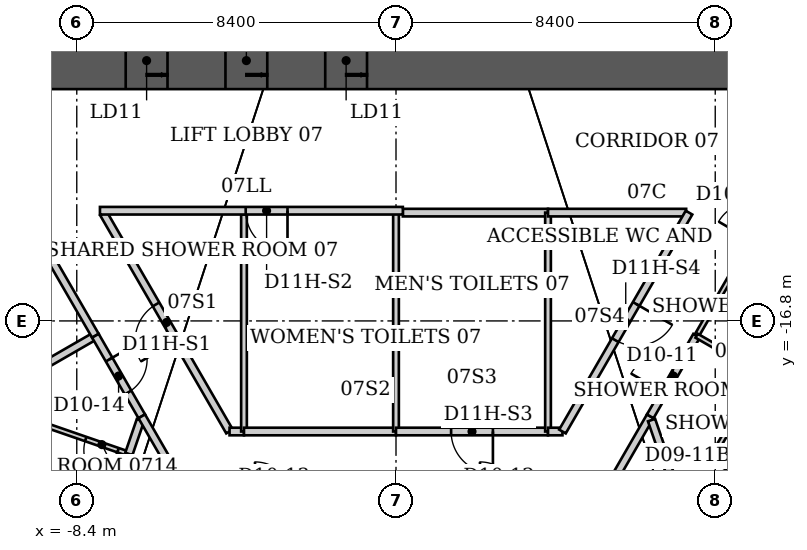
"""IFC4 building model, lengths in metres.
Left out: names, types, materials, properties, quantities, classifications, styles, units other than length and angle.
Written with IfcOpenShell. Run it as: python <this file> out.ifc"""

import sys

from ifc_helpers import new_model, si_unit, direction, frame, frame_2d, origin, place, context, subcontext, project, spatial, rectangle, extrude, element, fill, save


model = new_model("IFC4")
c1 = context("Model", 3, precision=1e-05, world=origin(), true_north=direction((0.0, 1.0)))
c2 = subcontext(c1, "Body", "Model", "MODEL_VIEW")
j1 = project(units=[si_unit("LENGTHUNIT", "METRE"), si_unit("PLANEANGLEUNIT", "RADIAN")], contexts=[c1])
p1 = place(None, origin())
s1 = spatial("IfcSite", under=j1, at=p1, CompositionType="ELEMENT")
p2 = place(p1, origin())
s2 = spatial("IfcBuilding", under=s1, at=p2, CompositionType="ELEMENT")
p3 = place(p2, frame((0.0, 0.0, 34.4)))
s3 = spatial("IfcBuildingStorey", under=s2, at=p3, CompositionType="ELEMENT", Elevation=34.4)
p4 = place(p3, frame((-9.25, -9.95, 0.0), z_axis=(0.0, 0.0, 1.0), x_axis=(1.0, 0.0, 0.0)))
e1 = element("IfcWall", 1, at=p4, inside=s3, PredefinedType="SHEAR", context=c2, shape_type="SweptSolid", body=[
    extrude(rectangle(XDim=18.5, YDim=1.5, at=frame_2d((9.25, 0.0))), origin(), (0.0, 0.0, 1.0), 3.8),
])
p5 = place(p4, frame((2.137, 0.0, 0.0)))
e2 = element("IfcOpeningElement", 2, at=p5, cuts=e1, PredefinedType="OPENING", context=c2, shape_type="SweptSolid", body=[
    extrude(rectangle(XDim=1.1, YDim=2.1, at=frame_2d((0.55, 1.05))), frame((0.0, 0.75, 0.0), z_axis=(0.0, -1.0, 0.0), x_axis=(1.0, 0.0, 0.0)), (0.0, 0.0, 1.0), 1.5),
])
p6 = place(p4, frame((4.762, 0.0, 0.0)))
e3 = element("IfcOpeningElement", 3, at=p6, cuts=e1, PredefinedType="OPENING", context=c2, shape_type="SweptSolid", body=[
    extrude(rectangle(XDim=1.1, YDim=2.1, at=frame_2d((0.55, 1.05))), frame((0.0, 0.75, 0.0), z_axis=(0.0, -1.0, 0.0), x_axis=(1.0, 0.0, 0.0)), (0.0, 0.0, 1.0), 1.5),
])
p7 = place(p4, frame((7.387, 0.0, 0.0)))
e4 = element("IfcOpeningElement", 4, at=p7, cuts=e1, PredefinedType="OPENING", context=c2, shape_type="SweptSolid", body=[
    extrude(rectangle(XDim=1.1, YDim=2.1, at=frame_2d((0.55, 1.05))), frame((0.0, 0.75, 0.0), z_axis=(0.0, -1.0, 0.0), x_axis=(1.0, 0.0, 0.0)), (0.0, 0.0, 1.0), 1.5),
])
p8 = place(p3, frame((-15.176, -21.38, 0.0), z_axis=(0.0, 0.0, 1.0), x_axis=(0.866276837306, 0.49956425127, 0.0)))
e5 = element("IfcWall", 5, at=p8, inside=s3, PredefinedType="PARTITIONING", context=c2, shape_type="SweptSolid", body=[
    extrude(rectangle(XDim=8.373, YDim=0.2, at=frame_2d((4.186, 0.0))), origin(), (0.0, 0.0, 1.0), 3.64),
])
p9 = place(p3, frame((-12.29, -9.62, 0.0), z_axis=(0.0, 0.0, 1.0), x_axis=(0.500830481537, -0.86554539382, 0.0)))
e6 = element("IfcWall", 6, at=p9, inside=s3, PredefinedType="PARTITIONING", context=c2, shape_type="SweptSolid", body=[
    extrude(rectangle(XDim=8.746, YDim=0.2, at=frame_2d((4.373, 0.0))), origin(), (0.0, 0.0, 1.0), 3.64),
])
p10 = place(p9, frame((3.823, 0.0, 0.0)))
e7 = element("IfcOpeningElement", 7, at=p10, cuts=e6, PredefinedType="OPENING", context=c2, shape_type="SweptSolid", body=[
    extrude(rectangle(XDim=1.1, YDim=2.2, at=frame_2d((0.55, 1.1))), frame((0.0, 0.1, 0.0), z_axis=(0.0, -1.0, 0.0), x_axis=(1.0, 0.0, 0.0)), (0.0, 0.0, 1.0), 0.2),
])
p11 = place(p3, frame((-7.91, -17.19, 0.0), z_axis=(0.0, 0.0, 1.0), x_axis=(0.498748634132, -0.866746675766, 0.0)))
e8 = element("IfcWall", 8, at=p11, inside=s3, PredefinedType="PARTITIONING", context=c2, shape_type="SweptSolid", body=[
    extrude(rectangle(XDim=2.446, YDim=0.2, at=frame_2d((1.223, 0.0))), origin(), (0.0, 0.0, 1.0), 3.64),
])
p12 = place(p11, frame((0.723, 0.0, 0.0)))
e9 = element("IfcOpeningElement", 9, at=p12, cuts=e8, PredefinedType="OPENING", context=c2, shape_type="SweptSolid", body=[
    extrude(rectangle(XDim=1.0, YDim=2.13, at=frame_2d((0.5, 1.065))), frame((0.0, 0.1, 0.0), z_axis=(0.0, -1.0, 0.0), x_axis=(1.0, 0.0, 0.0)), (0.0, 0.0, 1.0), 0.2),
])
p13 = place(p3, frame((-7.82, -22.57, 0.0), z_axis=(0.0, 0.0, 1.0), x_axis=(0.328693963496, 0.944436487203, 0.0)))
e10 = element("IfcWall", 10, at=p13, inside=s3, PredefinedType="PARTITIONING", context=c2, shape_type="SweptSolid", body=[
    extrude(rectangle(XDim=2.404, YDim=0.12, at=frame_2d((1.202, 0.0))), origin(), (0.0, 0.0, 1.0), 3.64),
])
p14 = place(p3, frame((-7.03, -20.3, 0.0), z_axis=(0.0, 0.0, 1.0), x_axis=(-0.94515546045, 0.326620813149, 0.0)))
e11 = element("IfcWall", 11, at=p14, inside=s3, PredefinedType="PARTITIONING", context=c2, shape_type="SweptSolid", body=[
    extrude(rectangle(XDim=2.603, YDim=0.12, at=frame_2d((1.301, 0.0))), origin(), (0.0, 0.0, 1.0), 3.64),
])
p15 = place(p14, frame((0.3, 0.0, 0.0)))
e12 = element("IfcOpeningElement", 12, at=p15, cuts=e11, PredefinedType="OPENING", context=c2, shape_type="SweptSolid", body=[
    extrude(rectangle(XDim=0.9, YDim=2.03, at=frame_2d((0.45, 1.015))), frame((0.0, 0.06, 0.0), z_axis=(0.0, -1.0, 0.0), x_axis=(1.0, 0.0, 0.0)), (0.0, 0.0, 1.0), 0.12),
])
p16 = place(p3, frame((-7.03, -20.3, 0.0), z_axis=(0.0, 0.0, 1.0), x_axis=(0.324737408014, 0.94580421644, 0.0)))
e13 = element("IfcWall", 13, at=p16, inside=s3, PredefinedType="PARTITIONING", context=c2, shape_type="SweptSolid", body=[
    extrude(rectangle(XDim=0.937, YDim=0.2, at=frame_2d((0.468, 0.0))), origin(), (0.0, 0.0, 1.0), 3.64),
])
p17 = place(p3, frame((-6.69, -19.31, 0.0), z_axis=(0.0, 0.0, 1.0), x_axis=(0.499963722229, -0.866046347752, 0.0)))
e14 = element("IfcWall", 14, at=p17, inside=s3, PredefinedType="PARTITIONING", context=c2, shape_type="SweptSolid", body=[
    extrude(rectangle(XDim=2.54, YDim=0.2, at=frame_2d((1.27, 0.0))), origin(), (0.0, 0.0, 1.0), 3.64),
])
p18 = place(p3, frame((-4.38, -19.71, 0.0), z_axis=(0.0, 0.0, 1.0), x_axis=(-0.500523653757, 0.865722860984, 0.0)))
e15 = element("IfcWall", 15, at=p18, inside=s3, PredefinedType="PARTITIONING", context=c2, shape_type="SweptSolid", body=[
    extrude(rectangle(XDim=6.628, YDim=0.2, at=frame_2d((3.314, 0.0))), origin(), (0.0, 0.0, 1.0), 3.64),
])
p19 = place(p18, frame((2.764, 0.0, 0.0)))
e16 = element("IfcOpeningElement", 16, at=p19, cuts=e15, PredefinedType="OPENING", context=c2, shape_type="SweptSolid", body=[
    extrude(rectangle(XDim=1.1, YDim=2.2, at=frame_2d((0.55, 1.1))), frame((0.0, 0.1, 0.0), z_axis=(0.0, -1.0, 0.0), x_axis=(1.0, 0.0, 0.0)), (0.0, 0.0, 1.0), 0.2),
])
p20 = place(p3, frame((-4.0, -19.71, 0.0), z_axis=(0.0, 0.0, 1.0), x_axis=(-1.0, 0.0, 0.0)))
e17 = element("IfcWall", 17, at=p20, inside=s3, PredefinedType="PARTITIONING", context=c2, shape_type="SweptSolid", body=[
    extrude(rectangle(XDim=0.38, YDim=0.2, at=frame_2d((0.19, 0.0))), origin(), (0.0, 0.0, 1.0), 3.64),
])
p21 = place(p3, frame((-4.0, -14.0, 0.0), z_axis=(0.0, 0.0, 1.0), x_axis=(0.0, -1.0, 0.0)))
e18 = element("IfcWall", 18, at=p21, inside=s3, PredefinedType="PARTITIONING", context=c2, shape_type="SweptSolid", body=[
    extrude(rectangle(XDim=5.71, YDim=0.15, at=frame_2d((2.855, 0.0))), origin(), (0.0, 0.0, 1.0), 3.64),
])
p22 = place(p3, frame((0.0, -19.71, 0.0), z_axis=(0.0, 0.0, 1.0), x_axis=(-1.0, 0.0, 0.0)))
e19 = element("IfcWall", 19, at=p22, inside=s3, PredefinedType="PARTITIONING", context=c2, shape_type="SweptSolid", body=[
    extrude(rectangle(XDim=4.0, YDim=0.2, at=frame_2d((2.0, 0.0))), origin(), (0.0, 0.0, 1.0), 3.64),
])
p23 = place(p3, frame((0.0, -13.95, 0.0), z_axis=(0.0, 0.0, 1.0), x_axis=(0.0, -1.0, 0.0)))
e20 = element("IfcWall", 20, at=p23, inside=s3, PredefinedType="PARTITIONING", context=c2, shape_type="SweptSolid", body=[
    extrude(rectangle(XDim=5.76, YDim=0.15, at=frame_2d((2.88, 0.0))), origin(), (0.0, 0.0, 1.0), 2.86),
])
p24 = place(p3, frame((0.18, -13.95, 0.0), z_axis=(0.0, 0.0, 1.0), x_axis=(1.0, 0.0, 0.0)))
e21 = element("IfcWall", 21, at=p24, inside=s3, PredefinedType="PARTITIONING", context=c2, shape_type="SweptSolid", body=[
    extrude(rectangle(XDim=3.82, YDim=0.2, at=frame_2d((1.91, 0.0))), origin(), (0.0, 0.0, 1.0), 3.64),
])
p25 = place(p3, frame((0.18, -13.9, 0.0), z_axis=(0.0, 0.0, 1.0), x_axis=(-1.0, 0.0, 0.0)))
e22 = element("IfcWall", 22, at=p25, inside=s3, PredefinedType="PARTITIONING", context=c2, shape_type="SweptSolid", body=[
    extrude(rectangle(XDim=7.97, YDim=0.2, at=frame_2d((3.985, 0.0))), origin(), (0.0, 0.0, 1.0), 3.64),
])
p26 = place(p25, frame((3.035, 0.0, 0.0)))
e23 = element("IfcOpeningElement", 23, at=p26, cuts=e22, PredefinedType="OPENING", context=c2, shape_type="SweptSolid", body=[
    extrude(rectangle(XDim=1.1, YDim=2.2, at=frame_2d((0.55, 1.1))), frame((0.0, 0.1, 0.0), z_axis=(0.0, -1.0, 0.0), x_axis=(1.0, 0.0, 0.0)), (0.0, 0.0, 1.0), 0.2),
])
p27 = place(p3, frame((4.0, -19.71, 0.0), z_axis=(0.0, 0.0, 1.0), x_axis=(-1.0, 0.0, 0.0)))
e24 = element("IfcWall", 24, at=p27, inside=s3, PredefinedType="PARTITIONING", context=c2, shape_type="SweptSolid", body=[
    extrude(rectangle(XDim=4.0, YDim=0.2, at=frame_2d((2.0, 0.0))), origin(), (0.0, 0.0, 1.0), 3.64),
])
p28 = place(p27, frame((1.45, 0.0, 0.0)))
e25 = element("IfcOpeningElement", 25, at=p28, cuts=e24, PredefinedType="OPENING", context=c2, shape_type="SweptSolid", body=[
    extrude(rectangle(XDim=1.1, YDim=2.2, at=frame_2d((0.55, 1.1))), frame((0.0, 0.1, 0.0), z_axis=(0.0, -1.0, 0.0), x_axis=(1.0, 0.0, 0.0)), (0.0, 0.0, 1.0), 0.2),
])
p29 = place(p3, frame((4.0, -13.95, 0.0), z_axis=(0.0, 0.0, 1.0), x_axis=(0.0, -1.0, 0.0)))
e26 = element("IfcWall", 26, at=p29, inside=s3, PredefinedType="PARTITIONING", context=c2, shape_type="SweptSolid", body=[
    extrude(rectangle(XDim=5.76, YDim=0.15, at=frame_2d((2.88, 0.0))), origin(), (0.0, 0.0, 1.0), 3.64),
])
p30 = place(p3, frame((4.0, -13.95, 0.0), z_axis=(0.0, 0.0, 1.0), x_axis=(1.0, 0.0, 0.0)))
e27 = element("IfcWall", 27, at=p30, inside=s3, PredefinedType="PARTITIONING", context=c2, shape_type="SweptSolid", body=[
    extrude(rectangle(XDim=3.635, YDim=0.2, at=frame_2d((1.817, 0.0))), origin(), (0.0, 0.0, 1.0), 3.64),
])
p31 = place(p3, frame((4.38, -19.71, 0.0), z_axis=(0.0, 0.0, 1.0), x_axis=(-1.0, 0.0, 0.0)))
e28 = element("IfcWall", 28, at=p31, inside=s3, PredefinedType="PARTITIONING", context=c2, shape_type="SweptSolid", body=[
    extrude(rectangle(XDim=0.38, YDim=0.2, at=frame_2d((0.19, 0.0))), origin(), (0.0, 0.0, 1.0), 3.64),
])
p32 = place(p3, frame((5.42, -21.51, 0.0), z_axis=(0.0, 0.0, 1.0), x_axis=(0.499963722229, 0.866046347752, 0.0)))
e29 = element("IfcWall", 29, at=p32, inside=s3, PredefinedType="PARTITIONING", context=c2, shape_type="SweptSolid", body=[
    extrude(rectangle(XDim=2.54, YDim=0.2, at=frame_2d((1.27, 0.0))), origin(), (0.0, 0.0, 1.0), 3.64),
])
p33 = place(p3, frame((6.69, -19.31, 0.0), z_axis=(0.0, 0.0, 1.0), x_axis=(0.498748634132, 0.866746675766, 0.0)))
e30 = element("IfcWall", 30, at=p33, inside=s3, PredefinedType="PARTITIONING", context=c2, shape_type="SweptSolid", body=[
    extrude(rectangle(XDim=2.446, YDim=0.2, at=frame_2d((1.223, 0.0))), origin(), (0.0, 0.0, 1.0), 3.64),
])
p34 = place(p33, frame((0.723, 0.0, 0.0)))
e31 = element("IfcOpeningElement", 31, at=p34, cuts=e30, PredefinedType="OPENING", context=c2, shape_type="SweptSolid", body=[
    extrude(rectangle(XDim=1.0, YDim=2.13, at=frame_2d((0.5, 1.065))), frame((0.0, 0.1, 0.0), z_axis=(0.0, -1.0, 0.0), x_axis=(1.0, 0.0, 0.0)), (0.0, 0.0, 1.0), 0.2),
])
p35 = place(p3, frame((6.724, -19.409, 0.0), z_axis=(0.0, 0.0, 1.0), x_axis=(0.326182205696, -0.945306917719, 0.0)))
e32 = element("IfcWall", 32, at=p35, inside=s3, PredefinedType="PARTITIONING", context=c2, shape_type="SweptSolid", body=[
    extrude(rectangle(XDim=2.593, YDim=0.2, at=frame_2d((1.296, 0.0))), origin(), (0.0, 0.0, 1.0), 3.64),
])
p36 = place(p3, frame((7.71, -13.95, 0.0), z_axis=(0.0, 0.0, 1.0), x_axis=(-0.500511113963, -0.865730110831, 0.0)))
e33 = element("IfcWall", 33, at=p36, inside=s3, PredefinedType="PARTITIONING", context=c2, shape_type="SweptSolid", body=[
    extrude(rectangle(XDim=6.653, YDim=0.2, at=frame_2d((3.327, 0.0))), origin(), (0.0, 0.0, 1.0), 3.64),
])
p37 = place(p36, frame((2.777, 0.0, 0.0)))
e34 = element("IfcOpeningElement", 34, at=p37, cuts=e33, PredefinedType="OPENING", context=c2, shape_type="SweptSolid", body=[
    extrude(rectangle(XDim=1.1, YDim=2.2, at=frame_2d((0.55, 1.1))), frame((0.0, 0.1, 0.0), z_axis=(0.0, -1.0, 0.0), x_axis=(1.0, 0.0, 0.0)), (0.0, 0.0, 1.0), 0.2),
])
p38 = place(p3, frame((7.91, -17.19, 0.0), z_axis=(0.0, 0.0, 1.0), x_axis=(0.499737123639, 0.866177122335, 0.0)))
e35 = element("IfcWall", 35, at=p38, inside=s3, PredefinedType="PARTITIONING", context=c2, shape_type="SweptSolid", body=[
    extrude(rectangle(XDim=2.401, YDim=0.12, at=frame_2d((1.201, 0.0))), origin(), (0.0, 0.0, 1.0), 3.64),
])
p39 = place(p3, frame((7.91, -17.19, 0.0), z_axis=(0.0, 0.0, 1.0), x_axis=(0.8673242112, -0.497743621421, 0.0)))
e36 = element("IfcWall", 36, at=p39, inside=s3, PredefinedType="PARTITIONING", context=c2, shape_type="SweptSolid", body=[
    extrude(rectangle(XDim=1.949, YDim=0.12, at=frame_2d((0.974, 0.0))), origin(), (0.0, 0.0, 1.0), 3.64),
])
p40 = place(p3, frame((8.3, -20.42, 0.0), z_axis=(0.0, 0.0, 1.0), x_axis=(0.866177122335, -0.499737123639, 0.0)))
e37 = element("IfcWall", 37, at=p40, inside=s3, PredefinedType="PARTITIONING", context=c2, shape_type="SweptSolid", body=[
    extrude(rectangle(XDim=2.401, YDim=0.12, at=frame_2d((1.201, 0.0))), origin(), (0.0, 0.0, 1.0), 3.64),
])
p41 = place(p3, frame((9.6, -18.16, 0.0), z_axis=(0.0, 0.0, 1.0), x_axis=(-0.498627694264, -0.866816256489, 0.0)))
e38 = element("IfcWall", 38, at=p41, inside=s3, PredefinedType="PARTITIONING", context=c2, shape_type="SweptSolid", body=[
    extrude(rectangle(XDim=2.607, YDim=0.12, at=frame_2d((1.304, 0.0))), origin(), (0.0, 0.0, 1.0), 3.64),
])
p42 = place(p41, frame((0.3, 0.0, 0.0)))
e39 = element("IfcOpeningElement", 39, at=p42, cuts=e38, PredefinedType="OPENING", context=c2, shape_type="SweptSolid", body=[
    extrude(rectangle(XDim=0.9, YDim=2.03, at=frame_2d((0.45, 1.015))), frame((0.0, 0.06, 0.0), z_axis=(0.0, -1.0, 0.0), x_axis=(1.0, 0.0, 0.0)), (0.0, 0.0, 1.0), 0.12),
])
p43 = place(p34, origin())
e40 = element("IfcDoor", 40, at=p43, inside=s3, OperationType="SINGLE_SWING_LEFT", PredefinedType="DOOR", context=c2, shape_type="SweptSolid", body=[
    extrude(rectangle(XDim=1.0, YDim=2.13, at=frame_2d((0.5, 1.065))), frame((0.0, 0.025, 0.0), z_axis=(0.0, -1.0, 0.0), x_axis=(1.0, 0.0, 0.0)), (0.0, 0.0, 1.0), 0.05),
])
fill(e31, e40)
p44 = place(p12, origin())
e41 = element("IfcDoor", 41, at=p44, inside=s3, OperationType="SINGLE_SWING_LEFT", PredefinedType="DOOR", context=c2, shape_type="SweptSolid", body=[
    extrude(rectangle(XDim=1.0, YDim=2.13, at=frame_2d((0.5, 1.065))), frame((0.0, 0.025, 0.0), z_axis=(0.0, -1.0, 0.0), x_axis=(1.0, 0.0, 0.0)), (0.0, 0.0, 1.0), 0.05),
])
fill(e9, e41)
p45 = place(p15, origin())
e42 = element("IfcDoor", 42, at=p45, inside=s3, OperationType="SINGLE_SWING_LEFT", PredefinedType="DOOR", context=c2, shape_type="SweptSolid", body=[
    extrude(rectangle(XDim=0.9, YDim=2.03, at=frame_2d((0.45, 1.015))), frame((0.0, 0.025, 0.0), z_axis=(0.0, -1.0, 0.0), x_axis=(1.0, 0.0, 0.0)), (0.0, 0.0, 1.0), 0.05),
])
fill(e12, e42)
p46 = place(p19, origin())
e43 = element("IfcDoor", 43, at=p46, inside=s3, OperationType="SINGLE_SWING_LEFT", PredefinedType="DOOR", context=c2, shape_type="SweptSolid", body=[
    extrude(rectangle(XDim=1.1, YDim=2.2, at=frame_2d((0.55, 1.1))), frame((0.0, 0.025, 0.0), z_axis=(0.0, -1.0, 0.0), x_axis=(1.0, 0.0, 0.0)), (0.0, 0.0, 1.0), 0.05),
])
fill(e16, e43)
p47 = place(p26, origin())
e44 = element("IfcDoor", 44, at=p47, inside=s3, OperationType="SINGLE_SWING_LEFT", PredefinedType="DOOR", context=c2, shape_type="SweptSolid", body=[
    extrude(rectangle(XDim=1.1, YDim=2.2, at=frame_2d((0.55, 1.1))), frame((0.0, 0.025, 0.0), z_axis=(0.0, -1.0, 0.0), x_axis=(1.0, 0.0, 0.0)), (0.0, 0.0, 1.0), 0.05),
])
fill(e23, e44)
p48 = place(p28, origin())
e45 = element("IfcDoor", 45, at=p48, inside=s3, OperationType="SINGLE_SWING_LEFT", PredefinedType="DOOR", context=c2, shape_type="SweptSolid", body=[
    extrude(rectangle(XDim=1.1, YDim=2.2, at=frame_2d((0.55, 1.1))), frame((0.0, 0.025, 0.0), z_axis=(0.0, -1.0, 0.0), x_axis=(1.0, 0.0, 0.0)), (0.0, 0.0, 1.0), 0.05),
])
fill(e25, e45)
p49 = place(p37, origin())
e46 = element("IfcDoor", 46, at=p49, inside=s3, OperationType="SINGLE_SWING_LEFT", PredefinedType="DOOR", context=c2, shape_type="SweptSolid", body=[
    extrude(rectangle(XDim=1.1, YDim=2.2, at=frame_2d((0.55, 1.1))), frame((0.0, 0.025, 0.0), z_axis=(0.0, -1.0, 0.0), x_axis=(1.0, 0.0, 0.0)), (0.0, 0.0, 1.0), 0.05),
])
fill(e34, e46)
p50 = place(p5, origin())
e47 = element("IfcDoor", 47, at=p50, inside=s3, OperationType="DOUBLE_DOOR_SLIDING", PredefinedType="DOOR", context=c2, shape_type="SweptSolid", body=[
    extrude(rectangle(XDim=1.1, YDim=2.1, at=frame_2d((0.55, 1.05))), frame((0.0, 0.025, 0.0), z_axis=(0.0, -1.0, 0.0), x_axis=(1.0, 0.0, 0.0)), (0.0, 0.0, 1.0), 0.05),
])
fill(e2, e47)
p51 = place(p6, origin())
e48 = element("IfcDoor", 48, at=p51, inside=s3, OperationType="DOUBLE_DOOR_SLIDING", PredefinedType="DOOR", context=c2, shape_type="SweptSolid", body=[
    extrude(rectangle(XDim=1.1, YDim=2.1, at=frame_2d((0.55, 1.05))), frame((0.0, 0.025, 0.0), z_axis=(0.0, -1.0, 0.0), x_axis=(1.0, 0.0, 0.0)), (0.0, 0.0, 1.0), 0.05),
])
fill(e3, e48)
p52 = place(p7, origin())
e49 = element("IfcDoor", 49, at=p52, inside=s3, OperationType="DOUBLE_DOOR_SLIDING", PredefinedType="DOOR", context=c2, shape_type="SweptSolid", body=[
    extrude(rectangle(XDim=1.1, YDim=2.1, at=frame_2d((0.55, 1.05))), frame((0.0, 0.025, 0.0), z_axis=(0.0, -1.0, 0.0), x_axis=(1.0, 0.0, 0.0)), (0.0, 0.0, 1.0), 0.05),
])
fill(e4, e49)
save(model, sys.argv[1])
